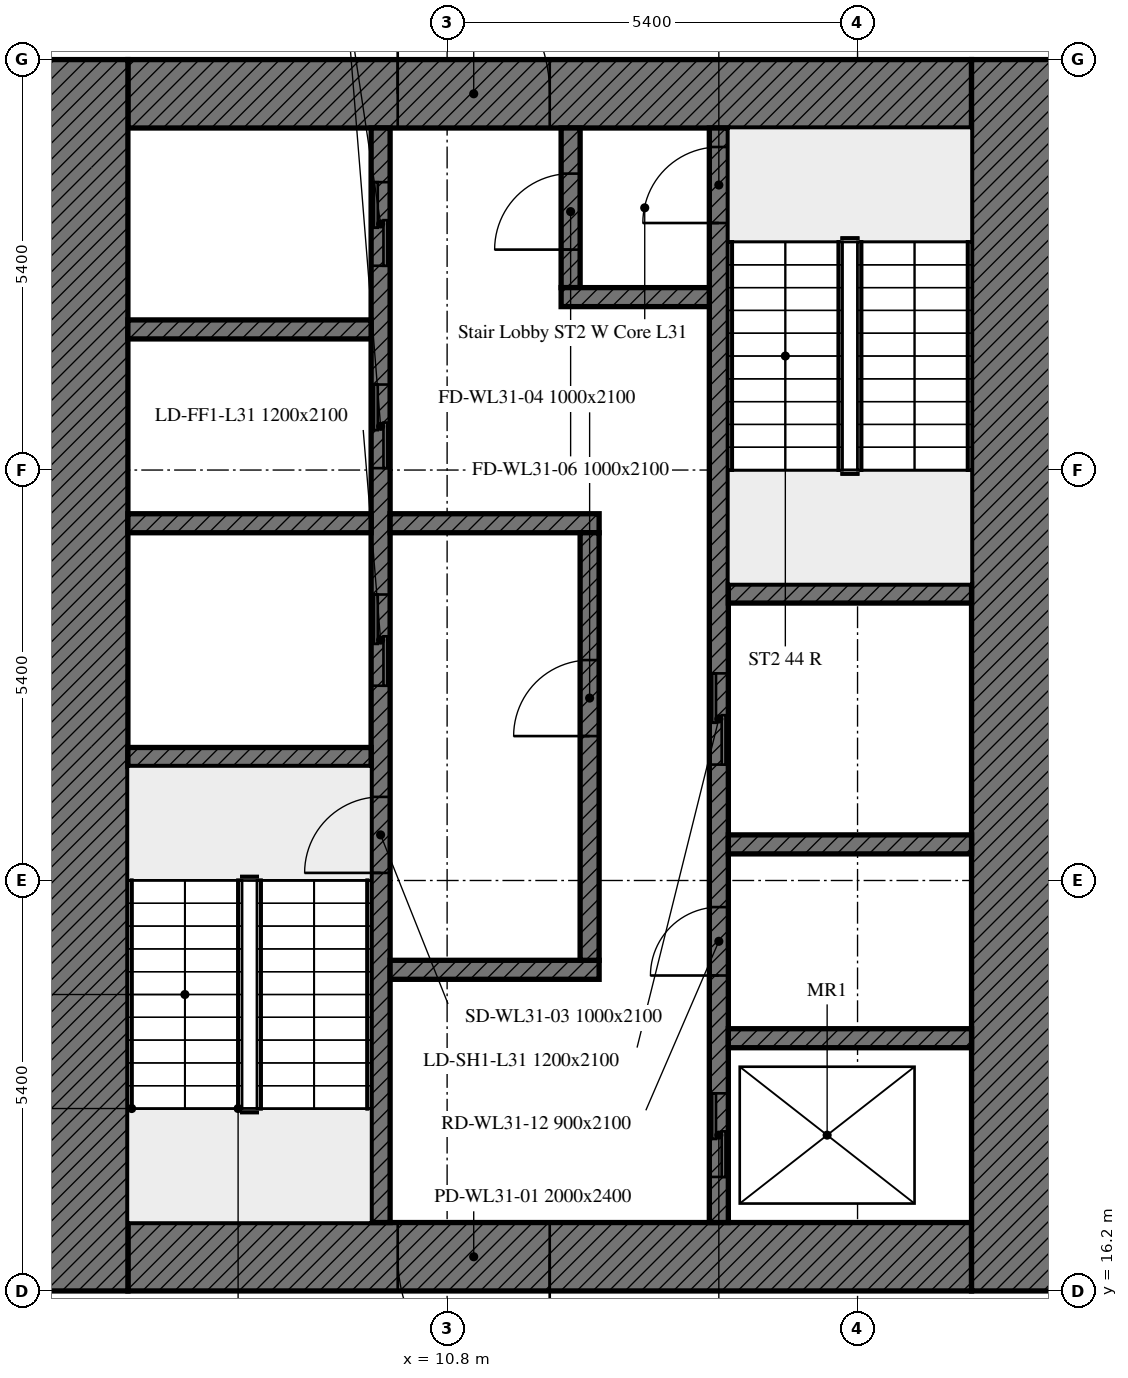
"""IFC4 building model, lengths in metres.
Left out: names, types, materials, properties, quantities, classifications, styles, units other than length and angle.
Written with IfcOpenShell. Run it as: python <this file> out.ifc"""

import sys

from ifc_helpers import new_model, si_unit, direction, frame, frame_2d, origin, place, context, subcontext, project, spatial, rectangle, extrude, element, fill, save


model = new_model("IFC4")
c1 = context("Model", 3, precision=1e-05, world=origin(), true_north=direction((0.0, 1.0)))
c2 = subcontext(c1, "Body", "Model", "MODEL_VIEW")
j1 = project(units=[si_unit("LENGTHUNIT", "METRE"), si_unit("PLANEANGLEUNIT", "RADIAN")], contexts=[c1])
p1 = place(None, origin())
s1 = spatial("IfcSite", under=j1, at=p1, CompositionType="ELEMENT")
p2 = place(p1, origin())
s2 = spatial("IfcBuilding", under=s1, at=p2, CompositionType="ELEMENT")
p3 = place(p2, frame((0.0, 0.0, 130.6)))
s3 = spatial("IfcBuildingStorey", under=s2, at=p3, CompositionType="ELEMENT", Elevation=130.6)
p4 = place(p3, frame((17.7, 16.65, 0.0), z_axis=(0.0, 0.0, 1.0), x_axis=(-1.0, 0.0, 0.0)))
e1 = element("IfcWall", 1, at=p4, inside=s3, PredefinedType="SOLIDWALL", context=c2, shape_type="SweptSolid", body=[
    extrude(rectangle(XDim=11.1, YDim=0.9, at=frame_2d((5.55, 0.0))), origin(), (0.0, 0.0, 1.0), 7.5),
])
p5 = place(p4, frame((5.55, 0.0, 0.0)))
e2 = element("IfcOpeningElement", 2, at=p5, cuts=e1, PredefinedType="OPENING", context=c2, shape_type="SweptSolid", body=[
    extrude(rectangle(XDim=2.0, YDim=2.4, at=frame_2d((1.0, 1.2))), frame((0.0, 0.45, 0.0), z_axis=(0.0, -1.0, 0.0), x_axis=(1.0, 0.0, 0.0)), (0.0, 0.0, 1.0), 0.9),
])
p6 = place(p3, frame((6.6, 31.95, 0.0), z_axis=(0.0, 0.0, 1.0), x_axis=(1.0, 0.0, 0.0)))
e3 = element("IfcWall", 3, at=p6, inside=s3, PredefinedType="SOLIDWALL", context=c2, shape_type="SweptSolid", body=[
    extrude(rectangle(XDim=11.1, YDim=0.9, at=frame_2d((5.55, 0.0))), origin(), (0.0, 0.0, 1.0), 7.5),
])
p7 = place(p6, frame((3.55, 0.0, 0.0)))
e4 = element("IfcOpeningElement", 4, at=p7, cuts=e3, PredefinedType="OPENING", context=c2, shape_type="SweptSolid", body=[
    extrude(rectangle(XDim=2.0, YDim=2.4, at=frame_2d((1.0, 1.2))), frame((0.0, 0.45, 0.0), z_axis=(0.0, -1.0, 0.0), x_axis=(1.0, 0.0, 0.0)), (0.0, 0.0, 1.0), 0.9),
])
for number, where, z_axis, x_axis in (
    (5, (6.0, 16.2, 0.0), (0.0, 0.0, 1.0), (0.0, 1.0, 0.0)),
    (6, (18.3, 32.4, 0.0), (0.0, 0.0, 1.0), (0.0, -1.0, 0.0)),
):
    element("IfcWall", number, at=place(p3, frame(where, z_axis=z_axis, x_axis=x_axis)), inside=s3, PredefinedType="SOLIDWALL", context=c2, shape_type="SweptSolid", body=[
        extrude(rectangle(XDim=16.2, YDim=1.2, at=frame_2d((8.1, 0.0))), origin(), (0.0, 0.0, 1.0), 7.5),
    ])
p8 = place(p3, frame((9.925, 17.1, 0.0), z_axis=(0.0, 0.0, 1.0), x_axis=(0.0, 1.0, 0.0)))
e7 = element("IfcWall", 7, at=p8, inside=s3, PredefinedType="SOLIDWALL", context=c2, shape_type="SweptSolid", body=[
    extrude(rectangle(XDim=14.4, YDim=0.25, at=frame_2d((7.2, 0.0))), origin(), (0.0, 0.0, 1.0), 7.5),
])
p9 = place(p8, frame((4.6, 0.0, 0.0)))
e8 = element("IfcOpeningElement", 8, at=p9, cuts=e7, PredefinedType="OPENING", context=c2, shape_type="SweptSolid", body=[
    extrude(rectangle(XDim=1.0, YDim=2.1, at=frame_2d((0.5, 1.05))), frame((0.0, 0.125, 0.0), z_axis=(0.0, -1.0, 0.0), x_axis=(1.0, 0.0, 0.0)), (0.0, 0.0, 1.0), 0.25),
])
p10 = place(p8, frame((7.062, 0.0, 0.0)))
e9 = element("IfcOpeningElement", 9, at=p10, cuts=e7, PredefinedType="OPENING", context=c2, shape_type="SweptSolid", body=[
    extrude(rectangle(XDim=1.2, YDim=2.1, at=frame_2d((0.6, 1.05))), frame((0.0, 0.125, 0.0), z_axis=(0.0, -1.0, 0.0), x_axis=(1.0, 0.0, 0.0)), (0.0, 0.0, 1.0), 0.25),
])
p11 = place(p8, frame((9.925, 0.0, 0.0)))
e10 = element("IfcOpeningElement", 10, at=p11, cuts=e7, PredefinedType="OPENING", context=c2, shape_type="SweptSolid", body=[
    extrude(rectangle(XDim=1.1, YDim=2.1, at=frame_2d((0.55, 1.05))), frame((0.0, 0.125, 0.0), z_axis=(0.0, -1.0, 0.0), x_axis=(1.0, 0.0, 0.0)), (0.0, 0.0, 1.0), 0.25),
])
p12 = place(p8, frame((12.587, 0.0, 0.0)))
e11 = element("IfcOpeningElement", 11, at=p12, cuts=e7, PredefinedType="OPENING", context=c2, shape_type="SweptSolid", body=[
    extrude(rectangle(XDim=1.1, YDim=2.1, at=frame_2d((0.55, 1.05))), frame((0.0, 0.125, 0.0), z_axis=(0.0, -1.0, 0.0), x_axis=(1.0, 0.0, 0.0)), (0.0, 0.0, 1.0), 0.25),
])
p13 = place(p3, frame((14.375, 17.1, 0.0), z_axis=(0.0, 0.0, 1.0), x_axis=(0.0, 1.0, 0.0)))
e12 = element("IfcWall", 12, at=p13, inside=s3, PredefinedType="SOLIDWALL", context=c2, shape_type="SweptSolid", body=[
    extrude(rectangle(XDim=14.4, YDim=0.25, at=frame_2d((7.2, 0.0))), origin(), (0.0, 0.0, 1.0), 7.5),
])
p14 = place(p13, frame((13.15, 0.0, 0.0)))
e13 = element("IfcOpeningElement", 13, at=p14, cuts=e12, PredefinedType="OPENING", context=c2, shape_type="SweptSolid", body=[
    extrude(rectangle(XDim=1.0, YDim=2.1, at=frame_2d((0.5, 1.05))), frame((0.0, 0.125, 0.0), z_axis=(0.0, -1.0, 0.0), x_axis=(1.0, 0.0, 0.0)), (0.0, 0.0, 1.0), 0.25),
])
p15 = place(p13, frame((0.6, 0.0, 0.0)))
e14 = element("IfcOpeningElement", 14, at=p15, cuts=e12, PredefinedType="OPENING", context=c2, shape_type="SweptSolid", body=[
    extrude(rectangle(XDim=1.1, YDim=2.1, at=frame_2d((0.55, 1.05))), frame((0.0, 0.125, 0.0), z_axis=(0.0, -1.0, 0.0), x_axis=(1.0, 0.0, 0.0)), (0.0, 0.0, 1.0), 0.25),
])
p16 = place(p13, frame((6.025, 0.0, 0.0)))
e15 = element("IfcOpeningElement", 15, at=p16, cuts=e12, PredefinedType="OPENING", context=c2, shape_type="SweptSolid", body=[
    extrude(rectangle(XDim=1.2, YDim=2.1, at=frame_2d((0.6, 1.05))), frame((0.0, 0.125, 0.0), z_axis=(0.0, -1.0, 0.0), x_axis=(1.0, 0.0, 0.0)), (0.0, 0.0, 1.0), 0.25),
])
p17 = place(p13, frame((3.25, 0.0, 0.0)))
e16 = element("IfcOpeningElement", 16, at=p17, cuts=e12, PredefinedType="OPENING", context=c2, shape_type="SweptSolid", body=[
    extrude(rectangle(XDim=0.9, YDim=2.1, at=frame_2d((0.45, 1.05))), frame((0.0, 0.125, 0.0), z_axis=(0.0, -1.0, 0.0), x_axis=(1.0, 0.0, 0.0)), (0.0, 0.0, 1.0), 0.25),
])
for number, where, z_axis, x_axis in (
    (17, (6.6, 23.225, 0.0), (0.0, 0.0, 1.0), (1.0, 0.0, 0.0)),
    (18, (14.5, 25.375, 0.0), (0.0, 0.0, 1.0), (1.0, 0.0, 0.0)),
    (19, (14.5, 22.075, 0.0), (0.0, 0.0, 1.0), (1.0, 0.0, 0.0)),
    (20, (6.6, 26.3, 0.0), (0.0, 0.0, 1.0), (1.0, 0.0, 0.0)),
):
    element("IfcWall", number, at=place(p3, frame(where, z_axis=z_axis, x_axis=x_axis)), inside=s3, PredefinedType="SOLIDWALL", context=c2, shape_type="SweptSolid", body=[
        extrude(rectangle(XDim=3.2, YDim=0.25, at=frame_2d((1.6, 0.0))), origin(), (0.0, 0.0, 1.0), 7.5),
    ])
for number, where, z_axis, x_axis in (
    (21, (10.05, 26.3, 0.0), (0.0, 0.0, 1.0), (1.0, 0.0, 0.0)),
    (22, (10.05, 20.425, 0.0), (0.0, 0.0, 1.0), (1.0, 0.0, 0.0)),
):
    element("IfcWall", number, at=place(p3, frame(where, z_axis=z_axis, x_axis=x_axis)), inside=s3, PredefinedType="SOLIDWALL", context=c2, shape_type="SweptSolid", body=[
        extrude(rectangle(XDim=2.75, YDim=0.25, at=frame_2d((1.375, 0.0))), origin(), (0.0, 0.0, 1.0), 7.5),
    ])
p18 = place(p3, frame((12.425, 29.4, 0.0), z_axis=(0.0, 0.0, 1.0), x_axis=(0.0, 1.0, 0.0)))
e23 = element("IfcWall", 23, at=p18, inside=s3, PredefinedType="SOLIDWALL", context=c2, shape_type="SweptSolid", body=[
    extrude(rectangle(XDim=2.1, YDim=0.25, at=frame_2d((1.05, 0.0))), origin(), (0.0, 0.0, 1.0), 7.5),
])
p19 = place(p18, frame((0.5, 0.0, 0.0)))
e24 = element("IfcOpeningElement", 24, at=p19, cuts=e23, PredefinedType="OPENING", context=c2, shape_type="SweptSolid", body=[
    extrude(rectangle(XDim=1.0, YDim=2.1, at=frame_2d((0.5, 1.05))), frame((0.0, 0.125, 0.0), z_axis=(0.0, -1.0, 0.0), x_axis=(1.0, 0.0, 0.0)), (0.0, 0.0, 1.0), 0.25),
])
p20 = place(p3, frame((12.3, 29.275, 0.0), z_axis=(0.0, 0.0, 1.0), x_axis=(1.0, 0.0, 0.0)))
e25 = element("IfcWall", 25, at=p20, inside=s3, PredefinedType="SOLIDWALL", context=c2, shape_type="SweptSolid", body=[
    extrude(rectangle(XDim=1.95, YDim=0.25, at=frame_2d((0.975, 0.0))), origin(), (0.0, 0.0, 1.0), 7.5),
])
p21 = place(p3, frame((12.675, 20.55, 0.0), z_axis=(0.0, 0.0, 1.0), x_axis=(0.0, 1.0, 0.0)))
e26 = element("IfcWall", 26, at=p21, inside=s3, PredefinedType="SOLIDWALL", context=c2, shape_type="SweptSolid", body=[
    extrude(rectangle(XDim=5.625, YDim=0.25, at=frame_2d((2.812, 0.0))), origin(), (0.0, 0.0, 1.0), 7.5),
])
p22 = place(p21, frame((2.95, 0.0, 0.0)))
e27 = element("IfcOpeningElement", 27, at=p22, cuts=e26, PredefinedType="OPENING", context=c2, shape_type="SweptSolid", body=[
    extrude(rectangle(XDim=1.0, YDim=2.1, at=frame_2d((0.5, 1.05))), frame((0.0, 0.125, 0.0), z_axis=(0.0, -1.0, 0.0), x_axis=(1.0, 0.0, 0.0)), (0.0, 0.0, 1.0), 0.25),
])
for number, where, z_axis, x_axis in (
    (28, (6.6, 28.85, 0.0), (0.0, 0.0, 1.0), (1.0, 0.0, 0.0)),
    (29, (14.5, 19.525, 0.0), (0.0, 0.0, 1.0), (1.0, 0.0, 0.0)),
):
    element("IfcWall", number, at=place(p3, frame(where, z_axis=z_axis, x_axis=x_axis)), inside=s3, PredefinedType="SOLIDWALL", context=c2, shape_type="SweptSolid", body=[
        extrude(rectangle(XDim=3.2, YDim=0.25, at=frame_2d((1.6, 0.0))), origin(), (0.0, 0.0, 1.0), 7.5),
    ])
p23 = place(p5, origin())
e30 = element("IfcDoor", 30, at=p23, inside=s3, OperationType="DOUBLE_DOOR_SINGLE_SWING", PredefinedType="DOOR", context=c2, shape_type="SweptSolid", body=[
    extrude(rectangle(XDim=2.0, YDim=2.4, at=frame_2d((1.0, 1.2))), frame((0.0, 0.025, 0.0), z_axis=(0.0, -1.0, 0.0), x_axis=(1.0, 0.0, 0.0)), (0.0, 0.0, 1.0), 0.05),
])
fill(e2, e30)
p24 = place(p7, origin())
e31 = element("IfcDoor", 31, at=p24, inside=s3, OperationType="DOUBLE_DOOR_SINGLE_SWING", PredefinedType="DOOR", context=c2, shape_type="SweptSolid", body=[
    extrude(rectangle(XDim=2.0, YDim=2.4, at=frame_2d((1.0, 1.2))), frame((0.0, 0.025, 0.0), z_axis=(0.0, -1.0, 0.0), x_axis=(1.0, 0.0, 0.0)), (0.0, 0.0, 1.0), 0.05),
])
fill(e4, e31)
p25 = place(p9, origin())
e32 = element("IfcDoor", 32, at=p25, inside=s3, OperationType="SINGLE_SWING_LEFT", PredefinedType="DOOR", context=c2, shape_type="SweptSolid", body=[
    extrude(rectangle(XDim=1.0, YDim=2.1, at=frame_2d((0.5, 1.05))), frame((0.0, 0.025, 0.0), z_axis=(0.0, -1.0, 0.0), x_axis=(1.0, 0.0, 0.0)), (0.0, 0.0, 1.0), 0.05),
])
fill(e8, e32)
p26 = place(p22, origin())
e33 = element("IfcDoor", 33, at=p26, inside=s3, OperationType="SINGLE_SWING_LEFT", PredefinedType="DOOR", context=c2, shape_type="SweptSolid", body=[
    extrude(rectangle(XDim=1.0, YDim=2.1, at=frame_2d((0.5, 1.05))), frame((0.0, 0.025, 0.0), z_axis=(0.0, -1.0, 0.0), x_axis=(1.0, 0.0, 0.0)), (0.0, 0.0, 1.0), 0.05),
])
fill(e27, e33)
p27 = place(p14, origin())
e34 = element("IfcDoor", 34, at=p27, inside=s3, OperationType="SINGLE_SWING_LEFT", PredefinedType="DOOR", context=c2, shape_type="SweptSolid", body=[
    extrude(rectangle(XDim=1.0, YDim=2.1, at=frame_2d((0.5, 1.05))), frame((0.0, 0.025, 0.0), z_axis=(0.0, -1.0, 0.0), x_axis=(1.0, 0.0, 0.0)), (0.0, 0.0, 1.0), 0.05),
])
fill(e13, e34)
p28 = place(p19, origin())
e35 = element("IfcDoor", 35, at=p28, inside=s3, OperationType="SINGLE_SWING_LEFT", PredefinedType="DOOR", context=c2, shape_type="SweptSolid", body=[
    extrude(rectangle(XDim=1.0, YDim=2.1, at=frame_2d((0.5, 1.05))), frame((0.0, 0.025, 0.0), z_axis=(0.0, -1.0, 0.0), x_axis=(1.0, 0.0, 0.0)), (0.0, 0.0, 1.0), 0.05),
])
fill(e24, e35)
p29 = place(p10, origin())
e36 = element("IfcDoor", 36, at=p29, inside=s3, OperationType="DOUBLE_DOOR_SLIDING", PredefinedType="DOOR", context=c2, shape_type="SweptSolid", body=[
    extrude(rectangle(XDim=1.2, YDim=2.1, at=frame_2d((0.6, 1.05))), frame((0.0, 0.025, 0.0), z_axis=(0.0, -1.0, 0.0), x_axis=(1.0, 0.0, 0.0)), (0.0, 0.0, 1.0), 0.05),
])
fill(e9, e36)
p30 = place(p11, origin())
e37 = element("IfcDoor", 37, at=p30, inside=s3, OperationType="DOUBLE_DOOR_SLIDING", PredefinedType="DOOR", context=c2, shape_type="SweptSolid", body=[
    extrude(rectangle(XDim=1.1, YDim=2.1, at=frame_2d((0.55, 1.05))), frame((0.0, 0.025, 0.0), z_axis=(0.0, -1.0, 0.0), x_axis=(1.0, 0.0, 0.0)), (0.0, 0.0, 1.0), 0.05),
])
fill(e10, e37)
p31 = place(p12, origin())
e38 = element("IfcDoor", 38, at=p31, inside=s3, OperationType="DOUBLE_DOOR_SLIDING", PredefinedType="DOOR", context=c2, shape_type="SweptSolid", body=[
    extrude(rectangle(XDim=1.1, YDim=2.1, at=frame_2d((0.55, 1.05))), frame((0.0, 0.025, 0.0), z_axis=(0.0, -1.0, 0.0), x_axis=(1.0, 0.0, 0.0)), (0.0, 0.0, 1.0), 0.05),
])
fill(e11, e38)
p32 = place(p15, origin())
e39 = element("IfcDoor", 39, at=p32, inside=s3, OperationType="DOUBLE_DOOR_SLIDING", PredefinedType="DOOR", context=c2, shape_type="SweptSolid", body=[
    extrude(rectangle(XDim=1.1, YDim=2.1, at=frame_2d((0.55, 1.05))), frame((0.0, 0.025, 0.0), z_axis=(0.0, -1.0, 0.0), x_axis=(1.0, 0.0, 0.0)), (0.0, 0.0, 1.0), 0.05),
])
fill(e14, e39)
p33 = place(p16, origin())
e40 = element("IfcDoor", 40, at=p33, inside=s3, OperationType="DOUBLE_DOOR_SLIDING", PredefinedType="DOOR", context=c2, shape_type="SweptSolid", body=[
    extrude(rectangle(XDim=1.2, YDim=2.1, at=frame_2d((0.6, 1.05))), frame((0.0, 0.025, 0.0), z_axis=(0.0, -1.0, 0.0), x_axis=(1.0, 0.0, 0.0)), (0.0, 0.0, 1.0), 0.05),
])
fill(e15, e40)
p34 = place(p17, origin())
e41 = element("IfcDoor", 41, at=p34, inside=s3, OperationType="SINGLE_SWING_LEFT", PredefinedType="DOOR", context=c2, shape_type="SweptSolid", body=[
    extrude(rectangle(XDim=0.9, YDim=2.1, at=frame_2d((0.45, 1.05))), frame((0.0, 0.025, 0.0), z_axis=(0.0, -1.0, 0.0), x_axis=(1.0, 0.0, 0.0)), (0.0, 0.0, 1.0), 0.05),
])
fill(e16, e41)
save(model, sys.argv[1])
